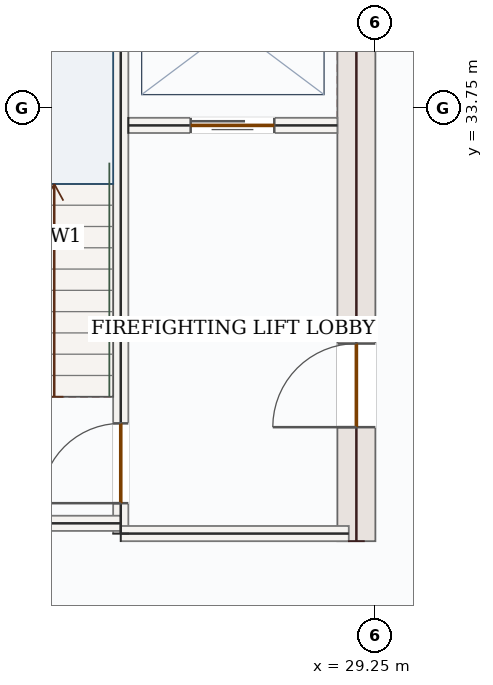
"""IFC4 building model, lengths in metres.
Left out: names, types, materials, properties, quantities, classifications, styles, units other than length and angle.
Written with IfcOpenShell. Run it as: python <this file> out.ifc"""

import sys

from ifc_helpers import new_model, si_unit, direction, frame, frame_2d, origin, place, context, subcontext, project, spatial, rectangle, extrude, source, transform, mapped, element, fill, save


model = new_model("IFC4")
c1 = context("Model", 3, precision=1e-05, world=origin(), true_north=direction((0.0, 1.0)))
c2 = subcontext(c1, "Body", "Model", "MODEL_VIEW")
j1 = project(units=[si_unit("LENGTHUNIT", "METRE"), si_unit("PLANEANGLEUNIT", "RADIAN")], contexts=[c1])
p1 = place(None, origin())
s1 = spatial("IfcSite", under=j1, at=p1, CompositionType="ELEMENT")
p2 = place(p1, origin())
s2 = spatial("IfcBuilding", under=s1, at=p2, CompositionType="ELEMENT")
p3 = place(p2, frame((0.0, 0.0, 201.9)))
s3 = spatial("IfcBuildingStorey", under=s2, at=p3, CompositionType="ELEMENT", Elevation=201.9)
p4 = place(p3, frame((29.0, 28.05, 0.0), z_axis=(0.0, 0.0, 1.0), x_axis=(0.0, 1.0, 0.0)))
e1 = element("IfcWall", 1, at=p4, inside=s3, PredefinedType="SHEAR", context=c2, shape_type="SweptSolid", body=[
    extrude(rectangle(XDim=8.55, YDim=0.5, at=frame_2d((4.275, 0.0))), origin(), (0.0, 0.0, 1.0), 3.62),
])
p5 = place(p4, frame((1.5, 0.0, 0.0)))
e2 = element("IfcOpeningElement", 2, at=p5, cuts=e1, PredefinedType="OPENING", context=c2, shape_type="SweptSolid", body=[
    extrude(rectangle(XDim=1.1, YDim=2.2, at=frame_2d((0.55, 1.1))), frame((0.0, 0.26, 0.0), z_axis=(0.0, -1.0, 0.0), x_axis=(1.0, 0.0, 0.0)), (0.0, 0.0, 1.0), 0.52),
])
p6 = place(p3, frame((25.9, 28.15, 0.0), z_axis=(0.0, 0.0, 1.0), x_axis=(0.0, 1.0, 0.0)))
e3 = element("IfcWall", 3, at=p6, inside=s3, PredefinedType="SOLIDWALL", context=c2, shape_type="SweptSolid", body=[
    extrude(rectangle(XDim=8.0, YDim=0.2, at=frame_2d((4.0, 0.0))), origin(), (0.0, 0.0, 1.0), 3.62),
])
p7 = place(p6, frame((0.4, 0.0, 0.0)))
e4 = element("IfcOpeningElement", 4, at=p7, cuts=e3, PredefinedType="OPENING", context=c2, shape_type="SweptSolid", body=[
    extrude(rectangle(XDim=1.05, YDim=2.15, at=frame_2d((0.525, 1.075))), frame((0.0, 0.11, 0.0), z_axis=(0.0, -1.0, 0.0), x_axis=(1.0, 0.0, 0.0)), (0.0, 0.0, 1.0), 0.22),
])
m1 = source(origin(), c2, "Body", "SweptSolid", [
    extrude(rectangle(XDim=4.25, YDim=0.2, at=frame_2d((2.125, 0.0))), origin(), (0.0, 0.0, 1.0), 3.62),
])
p8 = place(p3, frame((21.65, 28.285, 0.0), z_axis=(0.0, 0.0, 1.0), x_axis=(1.0, 0.0, 0.0)))
e5 = element("IfcWall", 5, at=p8, inside=s3, PredefinedType="SOLIDWALL", context=c2, shape_type="MappedRepresentation", body=[
    mapped(m1, transform((0.0, 0.0, 0.0), x_axis=(1.0, 0.0, 0.0), y_axis=(0.0, 1.0, 0.0), z_axis=(0.0, 0.0, 1.0), scale=1.0)),
])
m2 = source(origin(), c2, "Body", "SweptSolid", [
    extrude(rectangle(XDim=3.0, YDim=0.2, at=frame_2d((1.5, 0.0))), origin(), (0.0, 0.0, 1.0), 3.62),
])
p9 = place(p3, frame((25.9, 28.15, 0.0), z_axis=(0.0, 0.0, 1.0), x_axis=(1.0, 0.0, 0.0)))
e6 = element("IfcWall", 6, at=p9, inside=s3, PredefinedType="SOLIDWALL", context=c2, shape_type="MappedRepresentation", body=[
    mapped(m2, transform((0.0, 0.0, 0.0), x_axis=(1.0, 0.0, 0.0), y_axis=(0.0, 1.0, 0.0), z_axis=(0.0, 0.0, 1.0), scale=1.0)),
])
p10 = place(p3, frame((26.0, 33.52, 0.0), z_axis=(0.0, 0.0, 1.0), x_axis=(1.0, 0.0, 0.0)))
e7 = element("IfcWall", 7, at=p10, inside=s3, PredefinedType="SOLIDWALL", context=c2, shape_type="SweptSolid", body=[
    extrude(rectangle(XDim=2.75, YDim=0.2, at=frame_2d((1.375, 0.0))), origin(), (0.0, 0.0, 1.0), 3.62),
])
p11 = place(p10, frame((0.82, 0.0, 0.0)))
e8 = element("IfcOpeningElement", 8, at=p11, cuts=e7, PredefinedType="OPENING", context=c2, shape_type="SweptSolid", body=[
    extrude(rectangle(XDim=1.1, YDim=2.15, at=frame_2d((0.55, 1.075))), frame((0.0, 0.11, 0.0), z_axis=(0.0, -1.0, 0.0), x_axis=(1.0, 0.0, 0.0)), (0.0, 0.0, 1.0), 0.22),
])
m3 = source(origin(), c2, "Body", "SweptSolid", [
    extrude(rectangle(XDim=1.05, YDim=2.15, at=frame_2d((0.525, 1.075))), frame((0.0, 0.025, 0.0), z_axis=(0.0, -1.0, 0.0), x_axis=(1.0, 0.0, 0.0)), (0.0, 0.0, 1.0), 0.05),
])
p12 = place(p7, origin())
e9 = element("IfcDoor", 9, at=p12, inside=s3, OperationType="SINGLE_SWING_LEFT", PredefinedType="DOOR", context=c2, shape_type="MappedRepresentation", body=[
    mapped(m3, transform((0.0, 0.0, 0.0), x_axis=(1.0, 0.0, 0.0), y_axis=(0.0, 1.0, 0.0), z_axis=(0.0, 0.0, 1.0), scale=1.0)),
])
fill(e4, e9)
m4 = source(origin(), c2, "Body", "SweptSolid", [
    extrude(rectangle(XDim=1.1, YDim=2.15, at=frame_2d((0.55, 1.075))), frame((0.0, 0.025, 0.0), z_axis=(0.0, -1.0, 0.0), x_axis=(1.0, 0.0, 0.0)), (0.0, 0.0, 1.0), 0.05),
])
p13 = place(p11, origin())
e10 = element("IfcDoor", 10, at=p13, inside=s3, OperationType="DOUBLE_DOOR_SLIDING", PredefinedType="DOOR", context=c2, shape_type="MappedRepresentation", body=[
    mapped(m4, transform((0.0, 0.0, 0.0), x_axis=(1.0, 0.0, 0.0), y_axis=(0.0, 1.0, 0.0), z_axis=(0.0, 0.0, 1.0), scale=1.0)),
])
fill(e8, e10)
m5 = source(origin(), c2, "Body", "SweptSolid", [
    extrude(rectangle(XDim=1.1, YDim=2.2, at=frame_2d((0.55, 1.1))), frame((0.0, 0.025, 0.0), z_axis=(0.0, -1.0, 0.0), x_axis=(1.0, 0.0, 0.0)), (0.0, 0.0, 1.0), 0.05),
])
p14 = place(p5, origin())
e11 = element("IfcDoor", 11, at=p14, inside=s3, OperationType="SINGLE_SWING_LEFT", PredefinedType="DOOR", context=c2, shape_type="MappedRepresentation", body=[
    mapped(m5, transform((0.0, 0.0, 0.0), x_axis=(1.0, 0.0, 0.0), y_axis=(0.0, 1.0, 0.0), z_axis=(0.0, 0.0, 1.0), scale=1.0)),
])
fill(e2, e11)
save(model, sys.argv[1])
